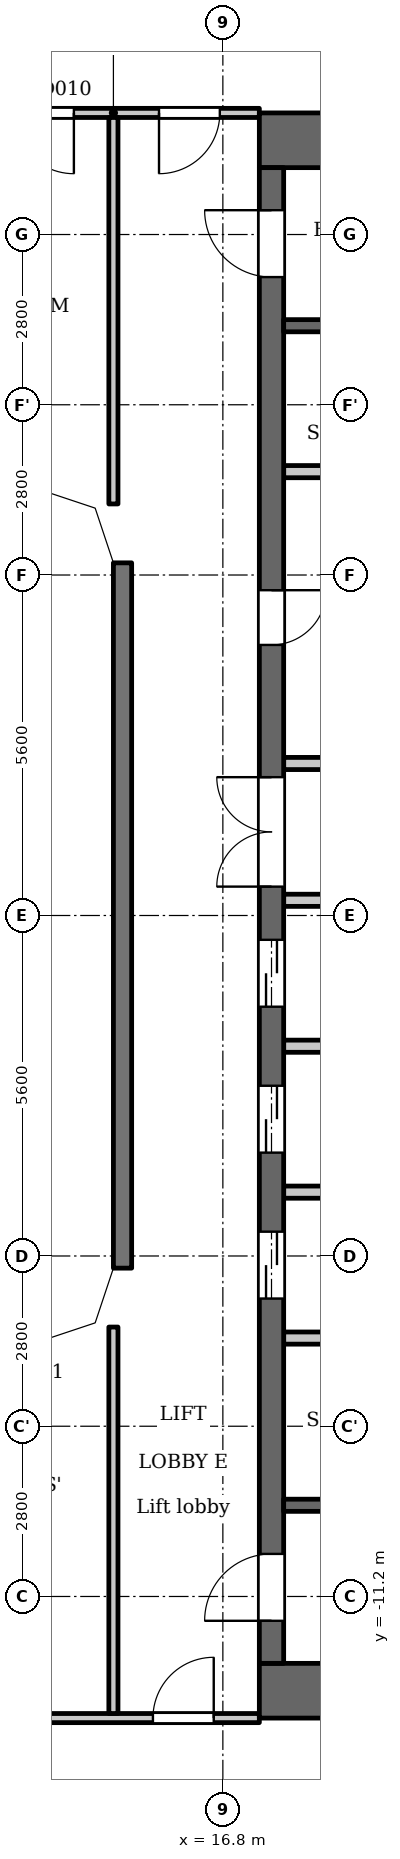
"""IFC4 building model, lengths in metres.
Left out: names, types, materials, properties, quantities, classifications, styles, units other than length and angle.
Written with IfcOpenShell. Run it as: python <this file> out.ifc"""

import sys

from ifc_helpers import new_model, si_unit, direction, frame, frame_2d, origin, place, context, subcontext, project, spatial, polyline, rectangle, outline, extrude, element, fill, save


model = new_model("IFC4")
c1 = context("Model", 3, precision=1e-05, world=origin(), true_north=direction((0.0, 1.0)))
c2 = subcontext(c1, "Body", "Model", "MODEL_VIEW")
j1 = project(units=[si_unit("LENGTHUNIT", "METRE"), si_unit("PLANEANGLEUNIT", "RADIAN")], contexts=[c1])
p1 = place(None, origin())
s1 = spatial("IfcSite", under=j1, at=p1, CompositionType="ELEMENT")
p2 = place(p1, origin())
s2 = spatial("IfcBuilding", under=s1, at=p2, CompositionType="ELEMENT")
p3 = place(p2, frame((0.0, 0.0, 30.5)))
s3 = spatial("IfcBuildingStorey", under=s2, at=p3, CompositionType="ELEMENT", Elevation=30.5)
p4 = place(p3, frame((15.15, 5.8, 0.0), z_axis=(0.0, 0.0, 1.0), x_axis=(0.0, -1.0, 0.0)))
e1 = element("IfcWall", 1, at=p4, inside=s3, PredefinedType="SOLIDWALL", context=c2, shape_type="SweptSolid", body=[
    extrude(rectangle(XDim=11.6, YDim=0.3, at=frame_2d((5.8, 0.0))), origin(), (0.0, 0.0, 1.0), 3.2),
])
for number, where, z_axis, x_axis in (
    (2, (17.4, 12.75, 0.0), (0.0, 0.0, 1.0), (1.0, 0.0, 0.0)),
    (3, (17.4, -12.75, 0.0), (0.0, 0.0, 1.0), (1.0, 0.0, 0.0)),
):
    element("IfcWall", number, at=place(p3, frame(where, z_axis=z_axis, x_axis=x_axis)), inside=s3, PredefinedType="SHEAR", context=c2, shape_type="SweptSolid", body=[
        extrude(rectangle(XDim=10.4, YDim=0.9, at=frame_2d((5.2, 0.0))), origin(), (0.0, 0.0, 1.0), 3.2),
    ])
p5 = place(p3, frame((17.6, -12.3, 0.0), z_axis=(0.0, 0.0, 1.0), x_axis=(0.0, 1.0, 0.0)))
e4 = element("IfcWall", 4, at=p5, inside=s3, PredefinedType="SHEAR", context=c2, shape_type="SweptSolid", body=[
    extrude(rectangle(XDim=24.6, YDim=0.4, at=frame_2d((12.3, 0.0))), origin(), (0.0, 0.0, 1.0), 3.2),
])
p6 = place(p5, frame((6.0, 0.0, 0.0)))
e5 = element("IfcOpeningElement", 5, at=p6, cuts=e4, PredefinedType="OPENING", context=c2, shape_type="SweptSolid", body=[
    extrude(rectangle(XDim=1.1, YDim=2.1, at=frame_2d((0.55, 1.05))), frame((0.0, 0.21, 0.0), z_axis=(0.0, -1.0, 0.0), x_axis=(1.0, 0.0, 0.0)), (0.0, 0.0, 1.0), 0.42),
])
p7 = place(p5, frame((8.4, 0.0, 0.0)))
e6 = element("IfcOpeningElement", 6, at=p7, cuts=e4, PredefinedType="OPENING", context=c2, shape_type="SweptSolid", body=[
    extrude(rectangle(XDim=1.1, YDim=2.1, at=frame_2d((0.55, 1.05))), frame((0.0, 0.21, 0.0), z_axis=(0.0, -1.0, 0.0), x_axis=(1.0, 0.0, 0.0)), (0.0, 0.0, 1.0), 0.42),
])
p8 = place(p5, frame((10.8, 0.0, 0.0)))
e7 = element("IfcOpeningElement", 7, at=p8, cuts=e4, PredefinedType="OPENING", context=c2, shape_type="SweptSolid", body=[
    extrude(rectangle(XDim=1.1, YDim=2.1, at=frame_2d((0.55, 1.05))), frame((0.0, 0.21, 0.0), z_axis=(0.0, -1.0, 0.0), x_axis=(1.0, 0.0, 0.0)), (0.0, 0.0, 1.0), 0.42),
])
p9 = place(p5, frame((16.75, 0.0, 0.0)))
e8 = element("IfcOpeningElement", 8, at=p9, cuts=e4, PredefinedType="OPENING", context=c2, shape_type="SweptSolid", body=[
    extrude(rectangle(XDim=0.9, YDim=2.1, at=frame_2d((0.45, 1.05))), frame((0.0, 0.21, 0.0), z_axis=(0.0, -1.0, 0.0), x_axis=(1.0, 0.0, 0.0)), (0.0, 0.0, 1.0), 0.42),
])
p10 = place(p5, frame((22.8, 0.0, 0.0)))
e9 = element("IfcOpeningElement", 9, at=p10, cuts=e4, PredefinedType="OPENING", context=c2, shape_type="SweptSolid", body=[
    extrude(rectangle(XDim=1.1, YDim=2.1, at=frame_2d((0.55, 1.05))), frame((0.0, 0.21, 0.0), z_axis=(0.0, -1.0, 0.0), x_axis=(1.0, 0.0, 0.0)), (0.0, 0.0, 1.0), 0.42),
])
p11 = place(p5, frame((0.7, 0.0, 0.0)))
e10 = element("IfcOpeningElement", 10, at=p11, cuts=e4, PredefinedType="OPENING", context=c2, shape_type="SweptSolid", body=[
    extrude(rectangle(XDim=1.1, YDim=2.1, at=frame_2d((0.55, 1.05))), frame((0.0, 0.21, 0.0), z_axis=(0.0, -1.0, 0.0), x_axis=(1.0, 0.0, 0.0)), (0.0, 0.0, 1.0), 0.42),
])
p12 = place(p5, frame((12.775, 0.0, 0.0)))
e11 = element("IfcOpeningElement", 11, at=p12, cuts=e4, PredefinedType="OPENING", context=c2, shape_type="SweptSolid", body=[
    extrude(rectangle(XDim=1.8, YDim=2.1, at=frame_2d((0.9, 1.05))), frame((0.0, 0.21, 0.0), z_axis=(0.0, -1.0, 0.0), x_axis=(1.0, 0.0, 0.0)), (0.0, 0.0, 1.0), 0.42),
])
p13 = place(p3, frame((17.8, -9.7, 0.0), z_axis=(0.0, 0.0, 1.0), x_axis=(1.0, 0.0, 0.0)))
e12 = element("IfcWall", 12, at=p13, inside=s3, PredefinedType="SHEAR", context=c2, shape_type="SweptSolid", body=[
    extrude(rectangle(XDim=8.3, YDim=0.2, at=frame_2d((4.15, 0.0))), origin(), (0.0, 0.0, 1.0), 3.2),
])
p14 = place(p13, frame((0.85, 0.0, 0.0)))
e13 = element("IfcOpeningElement", 13, at=p14, cuts=e12, PredefinedType="OPENING", context=c2, shape_type="SweptSolid", body=[
    extrude(rectangle(XDim=1.1, YDim=2.1, at=frame_2d((0.55, 1.05))), frame((0.0, 0.11, 0.0), z_axis=(0.0, -1.0, 0.0), x_axis=(1.0, 0.0, 0.0)), (0.0, 0.0, 1.0), 0.22),
])
p15 = place(p13, frame((3.75, 0.0, 0.0)))
e14 = element("IfcOpeningElement", 14, at=p15, cuts=e12, PredefinedType="OPENING", context=c2, shape_type="SweptSolid", body=[
    extrude(rectangle(XDim=1.1, YDim=2.1, at=frame_2d((0.55, 1.05))), frame((0.0, 0.11, 0.0), z_axis=(0.0, -1.0, 0.0), x_axis=(1.0, 0.0, 0.0)), (0.0, 0.0, 1.0), 0.22),
])
for number, where, z_axis, x_axis in (
    (15, (17.8, -6.95, 0.0), (0.0, 0.0, 1.0), (1.0, 0.0, 0.0)),
    (16, (17.8, -4.55, 0.0), (0.0, 0.0, 1.0), (1.0, 0.0, 0.0)),
    (17, (17.8, -2.15, 0.0), (0.0, 0.0, 1.0), (1.0, 0.0, 0.0)),
):
    element("IfcWall", number, at=place(p3, frame(where, z_axis=z_axis, x_axis=x_axis)), inside=s3, PredefinedType="PARTITIONING", context=c2, shape_type="SweptSolid", body=[
        extrude(rectangle(XDim=2.8, YDim=0.2, at=frame_2d((1.4, 0.0))), origin(), (0.0, 0.0, 1.0), 3.2),
    ])
for number, where, z_axis, x_axis in (
    (18, (17.8, 0.25, 0.0), (0.0, 0.0, 1.0), (1.0, 0.0, 0.0)),
    (19, (17.8, 2.5, 0.0), (0.0, 0.0, 1.0), (1.0, 0.0, 0.0)),
):
    element("IfcWall", number, at=place(p3, frame(where, z_axis=z_axis, x_axis=x_axis)), inside=s3, PredefinedType="PARTITIONING", context=c2, shape_type="SweptSolid", body=[
        extrude(rectangle(XDim=3.0, YDim=0.2, at=frame_2d((1.5, 0.0))), origin(), (0.0, 0.0, 1.0), 3.2),
    ])
p16 = place(p3, frame((17.8, 7.3, 0.0), z_axis=(0.0, 0.0, 1.0), x_axis=(1.0, 0.0, 0.0)))
e20 = element("IfcWall", 20, at=p16, inside=s3, PredefinedType="PARTITIONING", context=c2, shape_type="SweptSolid", body=[
    extrude(rectangle(XDim=2.8, YDim=0.2, at=frame_2d((1.4, 0.0))), origin(), (0.0, 0.0, 1.0), 3.2),
])
p17 = place(p3, frame((17.8, 9.7, 0.0), z_axis=(0.0, 0.0, 1.0), x_axis=(1.0, 0.0, 0.0)))
e21 = element("IfcWall", 21, at=p17, inside=s3, PredefinedType="SHEAR", context=c2, shape_type="SweptSolid", body=[
    extrude(rectangle(XDim=8.3, YDim=0.2, at=frame_2d((4.15, 0.0))), origin(), (0.0, 0.0, 1.0), 3.2),
])
p18 = place(p17, frame((0.85, 0.0, 0.0)))
e22 = element("IfcOpeningElement", 22, at=p18, cuts=e21, PredefinedType="OPENING", context=c2, shape_type="SweptSolid", body=[
    extrude(rectangle(XDim=1.1, YDim=2.1, at=frame_2d((0.55, 1.05))), frame((0.0, 0.11, 0.0), z_axis=(0.0, -1.0, 0.0), x_axis=(1.0, 0.0, 0.0)), (0.0, 0.0, 1.0), 0.22),
])
p19 = place(p17, frame((3.75, 0.0, 0.0)))
e23 = element("IfcOpeningElement", 23, at=p19, cuts=e21, PredefinedType="OPENING", context=c2, shape_type="SweptSolid", body=[
    extrude(rectangle(XDim=1.1, YDim=2.1, at=frame_2d((0.55, 1.05))), frame((0.0, 0.11, 0.0), z_axis=(0.0, -1.0, 0.0), x_axis=(1.0, 0.0, 0.0)), (0.0, 0.0, 1.0), 0.22),
])
p20 = place(p3, frame((-17.4, -13.2, 0.0), z_axis=(0.0, 0.0, 1.0), x_axis=(1.0, 0.0, 0.0)))
e24 = element("IfcWall", 24, at=p20, inside=s3, PredefinedType="PARTITIONING", context=c2, shape_type="SweptSolid", body=[
    extrude(rectangle(XDim=34.8, YDim=0.15, at=frame_2d((17.4, 0.0))), origin(), (0.0, 0.0, 1.0), 3.2),
])
p21 = place(p20, frame((0.65, 0.0, 0.0)))
e25 = element("IfcOpeningElement", 25, at=p21, cuts=e24, PredefinedType="OPENING", context=c2, shape_type="SweptSolid", body=[
    extrude(rectangle(XDim=1.0, YDim=2.1, at=frame_2d((0.5, 1.05))), frame((0.0, 0.085, 0.0), z_axis=(0.0, -1.0, 0.0), x_axis=(1.0, 0.0, 0.0)), (0.0, 0.0, 1.0), 0.17),
])
p22 = place(p20, frame((33.05, 0.0, 0.0)))
e26 = element("IfcOpeningElement", 26, at=p22, cuts=e24, PredefinedType="OPENING", context=c2, shape_type="SweptSolid", body=[
    extrude(rectangle(XDim=1.0, YDim=2.1, at=frame_2d((0.5, 1.05))), frame((0.0, 0.085, 0.0), z_axis=(0.0, -1.0, 0.0), x_axis=(1.0, 0.0, 0.0)), (0.0, 0.0, 1.0), 0.17),
])
p23 = place(p20, frame((4.55, 0.0, 0.0)))
e27 = element("IfcOpeningElement", 27, at=p23, cuts=e24, PredefinedType="OPENING", context=c2, shape_type="SweptSolid", body=[
    extrude(rectangle(XDim=1.0, YDim=2.1, at=frame_2d((0.5, 1.05))), frame((0.0, 0.085, 0.0), z_axis=(0.0, -1.0, 0.0), x_axis=(1.0, 0.0, 0.0)), (0.0, 0.0, 1.0), 0.17),
])
p24 = place(p20, frame((6.9, 0.0, 0.0)))
e28 = element("IfcOpeningElement", 28, at=p24, cuts=e24, PredefinedType="OPENING", context=c2, shape_type="SweptSolid", body=[
    extrude(rectangle(XDim=1.0, YDim=2.1, at=frame_2d((0.5, 1.05))), frame((0.0, 0.085, 0.0), z_axis=(0.0, -1.0, 0.0), x_axis=(1.0, 0.0, 0.0)), (0.0, 0.0, 1.0), 0.17),
])
p25 = place(p20, frame((15.75, 0.0, 0.0)))
e29 = element("IfcOpeningElement", 29, at=p25, cuts=e24, PredefinedType="OPENING", context=c2, shape_type="SweptSolid", body=[
    extrude(rectangle(XDim=1.0, YDim=2.1, at=frame_2d((0.5, 1.05))), frame((0.0, 0.085, 0.0), z_axis=(0.0, -1.0, 0.0), x_axis=(1.0, 0.0, 0.0)), (0.0, 0.0, 1.0), 0.17),
])
p26 = place(p20, frame((18.1, 0.0, 0.0)))
e30 = element("IfcOpeningElement", 30, at=p26, cuts=e24, PredefinedType="OPENING", context=c2, shape_type="SweptSolid", body=[
    extrude(rectangle(XDim=1.0, YDim=2.1, at=frame_2d((0.5, 1.05))), frame((0.0, 0.085, 0.0), z_axis=(0.0, -1.0, 0.0), x_axis=(1.0, 0.0, 0.0)), (0.0, 0.0, 1.0), 0.17),
])
p27 = place(p20, frame((26.95, 0.0, 0.0)))
e31 = element("IfcOpeningElement", 31, at=p27, cuts=e24, PredefinedType="OPENING", context=c2, shape_type="SweptSolid", body=[
    extrude(rectangle(XDim=1.0, YDim=2.1, at=frame_2d((0.5, 1.05))), frame((0.0, 0.085, 0.0), z_axis=(0.0, -1.0, 0.0), x_axis=(1.0, 0.0, 0.0)), (0.0, 0.0, 1.0), 0.17),
])
p28 = place(p20, frame((29.25, 0.0, 0.0)))
e32 = element("IfcOpeningElement", 32, at=p28, cuts=e24, PredefinedType="OPENING", context=c2, shape_type="SweptSolid", body=[
    extrude(rectangle(XDim=1.0, YDim=2.1, at=frame_2d((0.5, 1.05))), frame((0.0, 0.085, 0.0), z_axis=(0.0, -1.0, 0.0), x_axis=(1.0, 0.0, 0.0)), (0.0, 0.0, 1.0), 0.17),
])
p29 = place(p3, frame((-17.4, 13.2, 0.0), z_axis=(0.0, 0.0, 1.0), x_axis=(1.0, 0.0, 0.0)))
e33 = element("IfcWall", 33, at=p29, inside=s3, PredefinedType="PARTITIONING", context=c2, shape_type="SweptSolid", body=[
    extrude(rectangle(XDim=34.8, YDim=0.15, at=frame_2d((17.4, 0.0))), origin(), (0.0, 0.0, 1.0), 3.2),
])
p30 = place(p29, frame((0.75, 0.0, 0.0)))
e34 = element("IfcOpeningElement", 34, at=p30, cuts=e33, PredefinedType="OPENING", context=c2, shape_type="SweptSolid", body=[
    extrude(rectangle(XDim=1.0, YDim=2.1, at=frame_2d((0.5, 1.05))), frame((0.0, 0.085, 0.0), z_axis=(0.0, -1.0, 0.0), x_axis=(1.0, 0.0, 0.0)), (0.0, 0.0, 1.0), 0.17),
])
p31 = place(p29, frame((33.15, 0.0, 0.0)))
e35 = element("IfcOpeningElement", 35, at=p31, cuts=e33, PredefinedType="OPENING", context=c2, shape_type="SweptSolid", body=[
    extrude(rectangle(XDim=1.0, YDim=2.1, at=frame_2d((0.5, 1.05))), frame((0.0, 0.085, 0.0), z_axis=(0.0, -1.0, 0.0), x_axis=(1.0, 0.0, 0.0)), (0.0, 0.0, 1.0), 0.17),
])
p32 = place(p29, frame((3.05, 0.0, 0.0)))
e36 = element("IfcOpeningElement", 36, at=p32, cuts=e33, PredefinedType="OPENING", context=c2, shape_type="SweptSolid", body=[
    extrude(rectangle(XDim=1.0, YDim=2.1, at=frame_2d((0.5, 1.05))), frame((0.0, 0.085, 0.0), z_axis=(0.0, -1.0, 0.0), x_axis=(1.0, 0.0, 0.0)), (0.0, 0.0, 1.0), 0.17),
])
p33 = place(p29, frame((10.1, 0.0, 0.0)))
e37 = element("IfcOpeningElement", 37, at=p33, cuts=e33, PredefinedType="OPENING", context=c2, shape_type="SweptSolid", body=[
    extrude(rectangle(XDim=1.0, YDim=2.1, at=frame_2d((0.5, 1.05))), frame((0.0, 0.085, 0.0), z_axis=(0.0, -1.0, 0.0), x_axis=(1.0, 0.0, 0.0)), (0.0, 0.0, 1.0), 0.17),
])
p34 = place(p29, frame((12.45, 0.0, 0.0)))
e38 = element("IfcOpeningElement", 38, at=p34, cuts=e33, PredefinedType="OPENING", context=c2, shape_type="SweptSolid", body=[
    extrude(rectangle(XDim=1.0, YDim=2.1, at=frame_2d((0.5, 1.05))), frame((0.0, 0.085, 0.0), z_axis=(0.0, -1.0, 0.0), x_axis=(1.0, 0.0, 0.0)), (0.0, 0.0, 1.0), 0.17),
])
p35 = place(p29, frame((21.3, 0.0, 0.0)))
e39 = element("IfcOpeningElement", 39, at=p35, cuts=e33, PredefinedType="OPENING", context=c2, shape_type="SweptSolid", body=[
    extrude(rectangle(XDim=1.0, YDim=2.1, at=frame_2d((0.5, 1.05))), frame((0.0, 0.085, 0.0), z_axis=(0.0, -1.0, 0.0), x_axis=(1.0, 0.0, 0.0)), (0.0, 0.0, 1.0), 0.17),
])
p36 = place(p29, frame((23.65, 0.0, 0.0)))
e40 = element("IfcOpeningElement", 40, at=p36, cuts=e33, PredefinedType="OPENING", context=c2, shape_type="SweptSolid", body=[
    extrude(rectangle(XDim=1.0, YDim=2.1, at=frame_2d((0.5, 1.05))), frame((0.0, 0.085, 0.0), z_axis=(0.0, -1.0, 0.0), x_axis=(1.0, 0.0, 0.0)), (0.0, 0.0, 1.0), 0.17),
])
p37 = place(p29, frame((30.75, 0.0, 0.0)))
e41 = element("IfcOpeningElement", 41, at=p37, cuts=e33, PredefinedType="OPENING", context=c2, shape_type="SweptSolid", body=[
    extrude(rectangle(XDim=1.0, YDim=2.1, at=frame_2d((0.5, 1.05))), frame((0.0, 0.085, 0.0), z_axis=(0.0, -1.0, 0.0), x_axis=(1.0, 0.0, 0.0)), (0.0, 0.0, 1.0), 0.17),
])
for number, where, z_axis, x_axis in (
    (42, (15.0, -13.125, 0.0), (0.0, 0.0, 1.0), (0.0, 1.0, 0.0)),
    (43, (15.0, 6.769, 0.0), (0.0, 0.0, 1.0), (0.0, 1.0, 0.0)),
):
    element("IfcWall", number, at=place(p3, frame(where, z_axis=z_axis, x_axis=x_axis)), inside=s3, PredefinedType="PARTITIONING", context=c2, shape_type="SweptSolid", body=[
        extrude(rectangle(XDim=6.356, YDim=0.15, at=frame_2d((3.178, 0.0))), origin(), (0.0, 0.0, 1.0), 3.2),
    ])
p38 = place(p3, origin())
e44 = element("IfcWall", 44, at=p38, inside=s3, PredefinedType="SOLIDWALL", context=c2, shape_type="SweptSolid", body=[
    extrude(outline(polyline([(14.937, 6.937), (13.849, 7.3), (13.8, 7.3), (13.8, 7.0), (14.7, 6.7), (15.0, 5.8), (15.3, 5.8), (15.3, 5.849), (14.937, 6.937)])), origin(), (0.0, 0.0, 1.0), 3.2),
])
e45 = element("IfcWall", 45, at=p38, inside=s3, PredefinedType="SOLIDWALL", context=c2, shape_type="SweptSolid", body=[
    extrude(outline(polyline([(14.937, -6.937), (15.3, -5.849), (15.3, -5.8), (15.0, -5.8), (14.7, -6.7), (13.8, -7.0), (13.8, -7.3), (13.849, -7.3), (14.937, -6.937)])), origin(), (0.0, 0.0, 1.0), 3.2),
])
p39 = place(p6, origin())
e46 = element("IfcDoor", 46, at=p39, inside=s3, OperationType="DOUBLE_DOOR_SLIDING", PredefinedType="DOOR", context=c2, shape_type="SweptSolid", body=[
    extrude(rectangle(XDim=1.1, YDim=2.1, at=frame_2d((0.55, 1.05))), frame((0.0, 0.025, 0.0), z_axis=(0.0, -1.0, 0.0), x_axis=(1.0, 0.0, 0.0)), (0.0, 0.0, 1.0), 0.05),
])
fill(e5, e46)
p40 = place(p7, origin())
e47 = element("IfcDoor", 47, at=p40, inside=s3, OperationType="DOUBLE_DOOR_SLIDING", PredefinedType="DOOR", context=c2, shape_type="SweptSolid", body=[
    extrude(rectangle(XDim=1.1, YDim=2.1, at=frame_2d((0.55, 1.05))), frame((0.0, 0.025, 0.0), z_axis=(0.0, -1.0, 0.0), x_axis=(1.0, 0.0, 0.0)), (0.0, 0.0, 1.0), 0.05),
])
fill(e6, e47)
p41 = place(p8, origin())
e48 = element("IfcDoor", 48, at=p41, inside=s3, OperationType="DOUBLE_DOOR_SLIDING", PredefinedType="DOOR", context=c2, shape_type="SweptSolid", body=[
    extrude(rectangle(XDim=1.1, YDim=2.1, at=frame_2d((0.55, 1.05))), frame((0.0, 0.025, 0.0), z_axis=(0.0, -1.0, 0.0), x_axis=(1.0, 0.0, 0.0)), (0.0, 0.0, 1.0), 0.05),
])
fill(e7, e48)
p42 = place(p9, origin())
e49 = element("IfcDoor", 49, at=p42, inside=s3, OperationType="SINGLE_SWING_RIGHT", PredefinedType="DOOR", context=c2, shape_type="SweptSolid", body=[
    extrude(rectangle(XDim=0.9, YDim=2.1, at=frame_2d((0.45, 1.05))), frame((0.0, 0.025, 0.0), z_axis=(0.0, -1.0, 0.0), x_axis=(1.0, 0.0, 0.0)), (0.0, 0.0, 1.0), 0.05),
])
fill(e8, e49)
p43 = place(p10, origin())
e50 = element("IfcDoor", 50, at=p43, inside=s3, OperationType="SINGLE_SWING_LEFT", PredefinedType="DOOR", context=c2, shape_type="SweptSolid", body=[
    extrude(rectangle(XDim=1.1, YDim=2.1, at=frame_2d((0.55, 1.05))), frame((0.0, 0.025, 0.0), z_axis=(0.0, -1.0, 0.0), x_axis=(1.0, 0.0, 0.0)), (0.0, 0.0, 1.0), 0.05),
])
fill(e9, e50)
p44 = place(p11, origin())
e51 = element("IfcDoor", 51, at=p44, inside=s3, OperationType="SINGLE_SWING_RIGHT", PredefinedType="DOOR", context=c2, shape_type="SweptSolid", body=[
    extrude(rectangle(XDim=1.1, YDim=2.1, at=frame_2d((0.55, 1.05))), frame((0.0, 0.025, 0.0), z_axis=(0.0, -1.0, 0.0), x_axis=(1.0, 0.0, 0.0)), (0.0, 0.0, 1.0), 0.05),
])
fill(e10, e51)
p45 = place(p12, origin())
e52 = element("IfcDoor", 52, at=p45, inside=s3, OperationType="DOUBLE_DOOR_SINGLE_SWING", PredefinedType="DOOR", context=c2, shape_type="SweptSolid", body=[
    extrude(rectangle(XDim=1.8, YDim=2.1, at=frame_2d((0.9, 1.05))), frame((0.0, 0.025, 0.0), z_axis=(0.0, -1.0, 0.0), x_axis=(1.0, 0.0, 0.0)), (0.0, 0.0, 1.0), 0.05),
])
fill(e11, e52)
p46 = place(p31, origin())
e53 = element("IfcDoor", 53, at=p46, inside=s3, OperationType="SINGLE_SWING_LEFT", PredefinedType="DOOR", context=c2, shape_type="SweptSolid", body=[
    extrude(rectangle(XDim=1.0, YDim=2.1, at=frame_2d((0.5, 1.05))), frame((0.0, 0.025, 0.0), z_axis=(0.0, -1.0, 0.0), x_axis=(1.0, 0.0, 0.0)), (0.0, 0.0, 1.0), 0.05),
])
fill(e35, e53)
p47 = place(p22, origin())
e54 = element("IfcDoor", 54, at=p47, inside=s3, OperationType="SINGLE_SWING_LEFT", PredefinedType="DOOR", context=c2, shape_type="SweptSolid", body=[
    extrude(rectangle(XDim=1.0, YDim=2.1, at=frame_2d((0.5, 1.05))), frame((0.0, 0.025, 0.0), z_axis=(0.0, -1.0, 0.0), x_axis=(1.0, 0.0, 0.0)), (0.0, 0.0, 1.0), 0.05),
])
fill(e26, e54)
p48 = place(p37, origin())
e55 = element("IfcDoor", 55, at=p48, inside=s3, OperationType="SINGLE_SWING_RIGHT", PredefinedType="DOOR", context=c2, shape_type="SweptSolid", body=[
    extrude(rectangle(XDim=1.0, YDim=2.1, at=frame_2d((0.5, 1.05))), frame((0.0, 0.025, 0.0), z_axis=(0.0, -1.0, 0.0), x_axis=(1.0, 0.0, 0.0)), (0.0, 0.0, 1.0), 0.05),
])
fill(e41, e55)
save(model, sys.argv[1])
